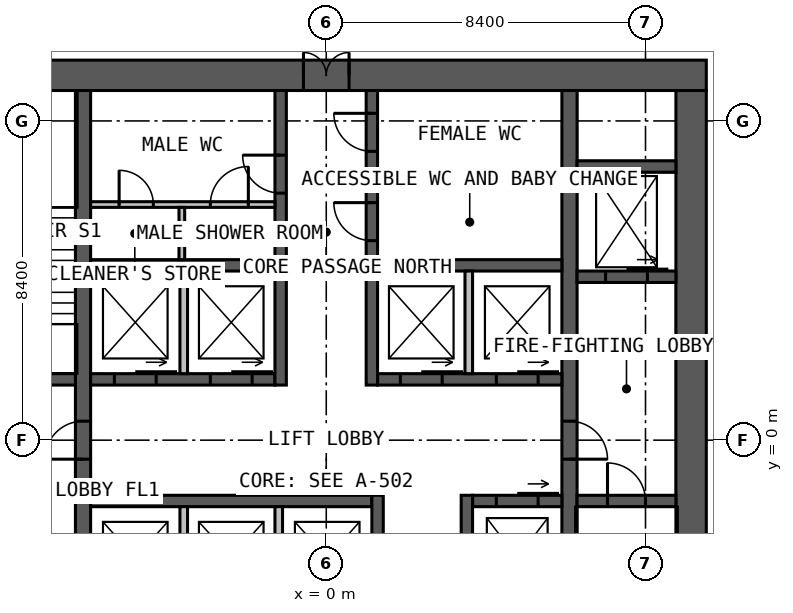
"""IFC4 building model, lengths in metres.
Left out: names, types, materials, properties, quantities, classifications, styles, units other than length and angle.
Written with IfcOpenShell. Run it as: python <this file> out.ifc"""

import sys

from ifc_helpers import new_model, si_unit, direction, frame, frame_2d, origin, place, context, subcontext, project, spatial, rectangle, extrude, element, fill, save


model = new_model("IFC4")
c1 = context("Model", 3, precision=1e-05, world=origin(), true_north=direction((0.0, 1.0)))
c2 = subcontext(c1, "Body", "Model", "MODEL_VIEW")
j1 = project(units=[si_unit("LENGTHUNIT", "METRE"), si_unit("PLANEANGLEUNIT", "RADIAN")], contexts=[c1])
p1 = place(None, origin())
s1 = spatial("IfcSite", under=j1, at=p1, CompositionType="ELEMENT")
p2 = place(p1, origin())
s2 = spatial("IfcBuilding", under=s1, at=p2, CompositionType="ELEMENT")
p3 = place(p2, frame((0.0, 0.0, 81.0)))
s3 = spatial("IfcBuildingStorey", under=s2, at=p3, CompositionType="ELEMENT", Elevation=81.0)
p4 = place(p3, frame((-10.0, 9.6, 0.0), z_axis=(0.0, 0.0, 1.0), x_axis=(1.0, 0.0, 0.0)))
e1 = element("IfcWall", 1, at=p4, inside=s3, PredefinedType="SOLIDWALL", context=c2, shape_type="SweptSolid", body=[
    extrude(rectangle(XDim=20.0, YDim=0.8, at=frame_2d((10.0, 0.0))), origin(), (0.0, 0.0, 1.0), 4.0),
])
p5 = place(p4, frame((9.4, 0.0, 0.0)))
e2 = element("IfcOpeningElement", 2, at=p5, cuts=e1, PredefinedType="OPENING", context=c2, shape_type="SweptSolid", body=[
    extrude(rectangle(XDim=1.2, YDim=2.2, at=frame_2d((0.6, 1.1))), frame((0.0, 0.41, 0.0), z_axis=(0.0, -1.0, 0.0), x_axis=(1.0, 0.0, 0.0)), (0.0, 0.0, 1.0), 0.82),
])
p6 = place(p3, frame((9.6, -9.2, 0.0), z_axis=(0.0, 0.0, 1.0), x_axis=(0.0, 1.0, 0.0)))
e3 = element("IfcWall", 3, at=p6, inside=s3, PredefinedType="SOLIDWALL", context=c2, shape_type="SweptSolid", body=[
    extrude(rectangle(XDim=18.4, YDim=0.8, at=frame_2d((9.2, 0.0))), origin(), (0.0, 0.0, 1.0), 4.0),
])
p7 = place(p3, frame((-6.4, -9.2, 0.0), z_axis=(0.0, 0.0, 1.0), x_axis=(0.0, 1.0, 0.0)))
e4 = element("IfcWall", 4, at=p7, inside=s3, PredefinedType="SOLIDWALL", context=c2, shape_type="SweptSolid", body=[
    extrude(rectangle(XDim=18.4, YDim=0.4, at=frame_2d((9.2, 0.0))), origin(), (0.0, 0.0, 1.0), 4.0),
])
p8 = place(p7, frame((8.7, 0.0, 0.0)))
e5 = element("IfcOpeningElement", 5, at=p8, cuts=e4, PredefinedType="OPENING", context=c2, shape_type="SweptSolid", body=[
    extrude(rectangle(XDim=1.0, YDim=2.2, at=frame_2d((0.5, 1.1))), frame((0.0, 0.21, 0.0), z_axis=(0.0, -1.0, 0.0), x_axis=(1.0, 0.0, 0.0)), (0.0, 0.0, 1.0), 0.42),
])
p9 = place(p3, frame((6.4, 9.2, 0.0), z_axis=(0.0, 0.0, 1.0), x_axis=(0.0, -1.0, 0.0)))
e6 = element("IfcWall", 6, at=p9, inside=s3, PredefinedType="SOLIDWALL", context=c2, shape_type="SweptSolid", body=[
    extrude(rectangle(XDim=18.4, YDim=0.4, at=frame_2d((9.2, 0.0))), origin(), (0.0, 0.0, 1.0), 4.0),
])
p10 = place(p9, frame((8.7, 0.0, 0.0)))
e7 = element("IfcOpeningElement", 7, at=p10, cuts=e6, PredefinedType="OPENING", context=c2, shape_type="SweptSolid", body=[
    extrude(rectangle(XDim=1.0, YDim=2.2, at=frame_2d((0.5, 1.1))), frame((0.0, 0.21, 0.0), z_axis=(0.0, -1.0, 0.0), x_axis=(1.0, 0.0, 0.0)), (0.0, 0.0, 1.0), 0.42),
])
p11 = place(p3, frame((-6.2, 1.6, 0.0), z_axis=(0.0, 0.0, 1.0), x_axis=(1.0, 0.0, 0.0)))
e8 = element("IfcWall", 8, at=p11, inside=s3, PredefinedType="SOLIDWALL", context=c2, shape_type="SweptSolid", body=[
    extrude(rectangle(XDim=4.85, YDim=0.3, at=frame_2d((2.425, 0.0))), origin(), (0.0, 0.0, 1.0), 4.0),
])
p12 = place(p11, frame((0.625, 0.0, 0.0)))
e9 = element("IfcOpeningElement", 9, at=p12, cuts=e8, PredefinedType="OPENING", context=c2, shape_type="SweptSolid", body=[
    extrude(rectangle(XDim=1.1, YDim=2.2, at=frame_2d((0.55, 1.1))), frame((0.0, 0.16, 0.0), z_axis=(0.0, -1.0, 0.0), x_axis=(1.0, 0.0, 0.0)), (0.0, 0.0, 1.0), 0.32),
])
p13 = place(p11, frame((3.15, 0.0, 0.0)))
e10 = element("IfcOpeningElement", 10, at=p13, cuts=e8, PredefinedType="OPENING", context=c2, shape_type="SweptSolid", body=[
    extrude(rectangle(XDim=1.1, YDim=2.2, at=frame_2d((0.55, 1.1))), frame((0.0, 0.16, 0.0), z_axis=(0.0, -1.0, 0.0), x_axis=(1.0, 0.0, 0.0)), (0.0, 0.0, 1.0), 0.32),
])
p14 = place(p3, frame((1.35, 1.6, 0.0), z_axis=(0.0, 0.0, 1.0), x_axis=(1.0, 0.0, 0.0)))
e11 = element("IfcWall", 11, at=p14, inside=s3, PredefinedType="SOLIDWALL", context=c2, shape_type="SweptSolid", body=[
    extrude(rectangle(XDim=4.85, YDim=0.3, at=frame_2d((2.425, 0.0))), origin(), (0.0, 0.0, 1.0), 4.0),
])
p15 = place(p14, frame((0.6, 0.0, 0.0)))
e12 = element("IfcOpeningElement", 12, at=p15, cuts=e11, PredefinedType="OPENING", context=c2, shape_type="SweptSolid", body=[
    extrude(rectangle(XDim=1.1, YDim=2.2, at=frame_2d((0.55, 1.1))), frame((0.0, 0.16, 0.0), z_axis=(0.0, -1.0, 0.0), x_axis=(1.0, 0.0, 0.0)), (0.0, 0.0, 1.0), 0.32),
])
p16 = place(p14, frame((3.125, 0.0, 0.0)))
e13 = element("IfcOpeningElement", 13, at=p16, cuts=e11, PredefinedType="OPENING", context=c2, shape_type="SweptSolid", body=[
    extrude(rectangle(XDim=1.1, YDim=2.2, at=frame_2d((0.55, 1.1))), frame((0.0, 0.16, 0.0), z_axis=(0.0, -1.0, 0.0), x_axis=(1.0, 0.0, 0.0)), (0.0, 0.0, 1.0), 0.32),
])
for number, where, z_axis, x_axis in (
    (14, (-6.2, 4.6, 0.0), (0.0, 0.0, 1.0), (1.0, 0.0, 0.0)),
    (15, (1.35, 4.6, 0.0), (0.0, 0.0, 1.0), (1.0, 0.0, 0.0)),
):
    element("IfcWall", number, at=place(p3, frame(where, z_axis=z_axis, x_axis=x_axis)), inside=s3, PredefinedType="SOLIDWALL", context=c2, shape_type="SweptSolid", body=[
        extrude(rectangle(XDim=4.85, YDim=0.3, at=frame_2d((2.425, 0.0))), origin(), (0.0, 0.0, 1.0), 4.0),
    ])
p17 = place(p3, frame((-1.2, 1.45, 0.0), z_axis=(0.0, 0.0, 1.0), x_axis=(0.0, 1.0, 0.0)))
e16 = element("IfcWall", 16, at=p17, inside=s3, PredefinedType="SOLIDWALL", context=c2, shape_type="SweptSolid", body=[
    extrude(rectangle(XDim=7.75, YDim=0.3, at=frame_2d((3.875, 0.0))), origin(), (0.0, 0.0, 1.0), 4.0),
])
p18 = place(p17, frame((5.05, 0.0, 0.0)))
e17 = element("IfcOpeningElement", 17, at=p18, cuts=e16, PredefinedType="OPENING", context=c2, shape_type="SweptSolid", body=[
    extrude(rectangle(XDim=1.0, YDim=2.2, at=frame_2d((0.5, 1.1))), frame((0.0, 0.16, 0.0), z_axis=(0.0, -1.0, 0.0), x_axis=(1.0, 0.0, 0.0)), (0.0, 0.0, 1.0), 0.32),
])
p19 = place(p3, frame((1.2, 1.45, 0.0), z_axis=(0.0, 0.0, 1.0), x_axis=(0.0, 1.0, 0.0)))
e18 = element("IfcWall", 18, at=p19, inside=s3, PredefinedType="SOLIDWALL", context=c2, shape_type="SweptSolid", body=[
    extrude(rectangle(XDim=7.75, YDim=0.3, at=frame_2d((3.875, 0.0))), origin(), (0.0, 0.0, 1.0), 4.0),
])
p20 = place(p19, frame((3.8, 0.0, 0.0)))
e19 = element("IfcOpeningElement", 19, at=p20, cuts=e18, PredefinedType="OPENING", context=c2, shape_type="SweptSolid", body=[
    extrude(rectangle(XDim=1.0, YDim=2.2, at=frame_2d((0.5, 1.1))), frame((0.0, 0.16, 0.0), z_axis=(0.0, -1.0, 0.0), x_axis=(1.0, 0.0, 0.0)), (0.0, 0.0, 1.0), 0.32),
])
p21 = place(p19, frame((6.15, 0.0, 0.0)))
e20 = element("IfcOpeningElement", 20, at=p21, cuts=e18, PredefinedType="OPENING", context=c2, shape_type="SweptSolid", body=[
    extrude(rectangle(XDim=1.0, YDim=2.2, at=frame_2d((0.5, 1.1))), frame((0.0, 0.16, 0.0), z_axis=(0.0, -1.0, 0.0), x_axis=(1.0, 0.0, 0.0)), (0.0, 0.0, 1.0), 0.32),
])
p22 = place(p3, frame((-6.2, -1.6, 0.0), z_axis=(0.0, 0.0, 1.0), x_axis=(1.0, 0.0, 0.0)))
e21 = element("IfcWall", 21, at=p22, inside=s3, PredefinedType="SOLIDWALL", context=c2, shape_type="SweptSolid", body=[
    extrude(rectangle(XDim=7.4, YDim=0.3, at=frame_2d((3.7, 0.0))), origin(), (0.0, 0.0, 1.0), 4.0),
])
p23 = place(p3, frame((3.85, -1.6, 0.0), z_axis=(0.0, 0.0, 1.0), x_axis=(1.0, 0.0, 0.0)))
e22 = element("IfcWall", 22, at=p23, inside=s3, PredefinedType="SOLIDWALL", context=c2, shape_type="SweptSolid", body=[
    extrude(rectangle(XDim=2.35, YDim=0.3, at=frame_2d((1.175, 0.0))), origin(), (0.0, 0.0, 1.0), 4.0),
])
p24 = place(p23, frame((0.625, 0.0, 0.0)))
e23 = element("IfcOpeningElement", 23, at=p24, cuts=e22, PredefinedType="OPENING", context=c2, shape_type="SweptSolid", body=[
    extrude(rectangle(XDim=1.1, YDim=2.2, at=frame_2d((0.55, 1.1))), frame((0.0, 0.16, 0.0), z_axis=(0.0, -1.0, 0.0), x_axis=(1.0, 0.0, 0.0)), (0.0, 0.0, 1.0), 0.32),
])
p25 = place(p3, frame((1.35, -1.45, 0.0), z_axis=(0.0, 0.0, 1.0), x_axis=(0.0, -1.0, 0.0)))
e24 = element("IfcWall", 24, at=p25, inside=s3, PredefinedType="SOLIDWALL", context=c2, shape_type="SweptSolid", body=[
    extrude(rectangle(XDim=7.75, YDim=0.3, at=frame_2d((3.875, 0.0))), origin(), (0.0, 0.0, 1.0), 4.0),
])
p26 = place(p25, frame((5.8, 0.0, 0.0)))
e25 = element("IfcOpeningElement", 25, at=p26, cuts=e24, PredefinedType="OPENING", context=c2, shape_type="SweptSolid", body=[
    extrude(rectangle(XDim=1.0, YDim=2.2, at=frame_2d((0.5, 1.1))), frame((0.0, 0.16, 0.0), z_axis=(0.0, -1.0, 0.0), x_axis=(1.0, 0.0, 0.0)), (0.0, 0.0, 1.0), 0.32),
])
p27 = place(p25, frame((3.525, 0.0, 0.0)))
e26 = element("IfcOpeningElement", 26, at=p27, cuts=e24, PredefinedType="OPENING", context=c2, shape_type="SweptSolid", body=[
    extrude(rectangle(XDim=0.9, YDim=2.2, at=frame_2d((0.45, 1.1))), frame((0.0, 0.16, 0.0), z_axis=(0.0, -1.0, 0.0), x_axis=(1.0, 0.0, 0.0)), (0.0, 0.0, 1.0), 0.32),
])
p28 = place(p3, frame((3.7, -1.45, 0.0), z_axis=(0.0, 0.0, 1.0), x_axis=(0.0, -1.0, 0.0)))
e27 = element("IfcWall", 27, at=p28, inside=s3, PredefinedType="SOLIDWALL", context=c2, shape_type="SweptSolid", body=[
    extrude(rectangle(XDim=7.75, YDim=0.3, at=frame_2d((3.875, 0.0))), origin(), (0.0, 0.0, 1.0), 4.0),
])
p29 = place(p28, frame((5.1, 0.0, 0.0)))
e28 = element("IfcOpeningElement", 28, at=p29, cuts=e27, PredefinedType="OPENING", context=c2, shape_type="SweptSolid", body=[
    extrude(rectangle(XDim=0.9, YDim=2.2, at=frame_2d((0.45, 1.1))), frame((0.0, 0.16, 0.0), z_axis=(0.0, -1.0, 0.0), x_axis=(1.0, 0.0, 0.0)), (0.0, 0.0, 1.0), 0.32),
])
p30 = place(p3, frame((-9.2, 1.6, 0.0), z_axis=(0.0, 0.0, 1.0), x_axis=(1.0, 0.0, 0.0)))
e29 = element("IfcWall", 29, at=p30, inside=s3, PredefinedType="SOLIDWALL", context=c2, shape_type="SweptSolid", body=[
    extrude(rectangle(XDim=2.6, YDim=0.3, at=frame_2d((1.3, 0.0))), origin(), (0.0, 0.0, 1.0), 4.0),
])
p31 = place(p30, frame((0.8, 0.0, 0.0)))
e30 = element("IfcOpeningElement", 30, at=p31, cuts=e29, PredefinedType="OPENING", context=c2, shape_type="SweptSolid", body=[
    extrude(rectangle(XDim=1.0, YDim=2.2, at=frame_2d((0.5, 1.1))), frame((0.0, 0.16, 0.0), z_axis=(0.0, -1.0, 0.0), x_axis=(1.0, 0.0, 0.0)), (0.0, 0.0, 1.0), 0.32),
])
p32 = place(p3, frame((6.6, -1.6, 0.0), z_axis=(0.0, 0.0, 1.0), x_axis=(1.0, 0.0, 0.0)))
e31 = element("IfcWall", 31, at=p32, inside=s3, PredefinedType="SOLIDWALL", context=c2, shape_type="SweptSolid", body=[
    extrude(rectangle(XDim=2.6, YDim=0.3, at=frame_2d((1.3, 0.0))), origin(), (0.0, 0.0, 1.0), 4.0),
])
p33 = place(p32, frame((0.8, 0.0, 0.0)))
e32 = element("IfcOpeningElement", 32, at=p33, cuts=e31, PredefinedType="OPENING", context=c2, shape_type="SweptSolid", body=[
    extrude(rectangle(XDim=1.0, YDim=2.2, at=frame_2d((0.5, 1.1))), frame((0.0, 0.16, 0.0), z_axis=(0.0, -1.0, 0.0), x_axis=(1.0, 0.0, 0.0)), (0.0, 0.0, 1.0), 0.32),
])
p34 = place(p3, frame((6.6, 4.3, 0.0), z_axis=(0.0, 0.0, 1.0), x_axis=(1.0, 0.0, 0.0)))
e33 = element("IfcWall", 33, at=p34, inside=s3, PredefinedType="SOLIDWALL", context=c2, shape_type="SweptSolid", body=[
    extrude(rectangle(XDim=2.6, YDim=0.3, at=frame_2d((1.3, 0.0))), origin(), (0.0, 0.0, 1.0), 4.0),
])
p35 = place(p34, frame((0.75, 0.0, 0.0)))
e34 = element("IfcOpeningElement", 34, at=p35, cuts=e33, PredefinedType="OPENING", context=c2, shape_type="SweptSolid", body=[
    extrude(rectangle(XDim=1.1, YDim=2.2, at=frame_2d((0.55, 1.1))), frame((0.0, 0.16, 0.0), z_axis=(0.0, -1.0, 0.0), x_axis=(1.0, 0.0, 0.0)), (0.0, 0.0, 1.0), 0.32),
])
p36 = place(p3, frame((6.6, 7.2, 0.0), z_axis=(0.0, 0.0, 1.0), x_axis=(1.0, 0.0, 0.0)))
e35 = element("IfcWall", 35, at=p36, inside=s3, PredefinedType="SOLIDWALL", context=c2, shape_type="SweptSolid", body=[
    extrude(rectangle(XDim=2.6, YDim=0.3, at=frame_2d((1.3, 0.0))), origin(), (0.0, 0.0, 1.0), 4.0),
])
for number, where, z_axis, x_axis in (
    (36, (-3.75, 1.75, 0.0), (0.0, 0.0, 1.0), (0.0, 1.0, 0.0)),
    (37, (3.75, 1.75, 0.0), (0.0, 0.0, 1.0), (0.0, 1.0, 0.0)),
    (38, (-3.75, -1.75, 0.0), (0.0, 0.0, 1.0), (0.0, -1.0, 0.0)),
    (39, (-1.25, -1.75, 0.0), (0.0, 0.0, 1.0), (0.0, -1.0, 0.0)),
):
    element("IfcWall", number, at=place(p3, frame(where, z_axis=z_axis, x_axis=x_axis)), inside=s3, PredefinedType="SOLIDWALL", context=c2, shape_type="SweptSolid", body=[
        extrude(rectangle(XDim=2.7, YDim=0.2, at=frame_2d((1.35, 0.0))), origin(), (0.0, 0.0, 1.0), 3.75),
    ])
p37 = place(p3, frame((1.35, 6.8, 0.0), z_axis=(0.0, 0.0, 1.0), x_axis=(1.0, 0.0, 0.0)))
e40 = element("IfcWall", 40, at=p37, inside=s3, PredefinedType="PARTITIONING", context=c2, shape_type="SweptSolid", body=[
    extrude(rectangle(XDim=4.85, YDim=0.15, at=frame_2d((2.425, 0.0))), origin(), (0.0, 0.0, 1.0), 3.75),
])
p38 = place(p3, frame((-6.2, 6.2, 0.0), z_axis=(0.0, 0.0, 1.0), x_axis=(1.0, 0.0, 0.0)))
e41 = element("IfcWall", 41, at=p38, inside=s3, PredefinedType="PARTITIONING", context=c2, shape_type="SweptSolid", body=[
    extrude(rectangle(XDim=4.85, YDim=0.15, at=frame_2d((2.425, 0.0))), origin(), (0.0, 0.0, 1.0), 3.75),
])
p39 = place(p38, frame((3.15, 0.0, 0.0)))
e42 = element("IfcOpeningElement", 42, at=p39, cuts=e41, PredefinedType="OPENING", context=c2, shape_type="SweptSolid", body=[
    extrude(rectangle(XDim=1.0, YDim=2.2, at=frame_2d((0.5, 1.1))), frame((0.0, 0.085, 0.0), z_axis=(0.0, -1.0, 0.0), x_axis=(1.0, 0.0, 0.0)), (0.0, 0.0, 1.0), 0.17),
])
p40 = place(p38, frame((0.75, 0.0, 0.0)))
e43 = element("IfcOpeningElement", 43, at=p40, cuts=e41, PredefinedType="OPENING", context=c2, shape_type="SweptSolid", body=[
    extrude(rectangle(XDim=0.9, YDim=2.2, at=frame_2d((0.45, 1.1))), frame((0.0, 0.085, 0.0), z_axis=(0.0, -1.0, 0.0), x_axis=(1.0, 0.0, 0.0)), (0.0, 0.0, 1.0), 0.17),
])
p41 = place(p3, frame((-3.8, 4.75, 0.0), z_axis=(0.0, 0.0, 1.0), x_axis=(0.0, 1.0, 0.0)))
e44 = element("IfcWall", 44, at=p41, inside=s3, PredefinedType="PARTITIONING", context=c2, shape_type="SweptSolid", body=[
    extrude(rectangle(XDim=1.375, YDim=0.15, at=frame_2d((0.688, 0.0))), origin(), (0.0, 0.0, 1.0), 3.75),
])
p42 = place(p5, origin())
e45 = element("IfcDoor", 45, at=p42, inside=s3, OperationType="DOUBLE_DOOR_SINGLE_SWING", PredefinedType="DOOR", context=c2, shape_type="SweptSolid", body=[
    extrude(rectangle(XDim=1.2, YDim=2.2, at=frame_2d((0.6, 1.1))), frame((0.0, 0.025, 0.0), z_axis=(0.0, -1.0, 0.0), x_axis=(1.0, 0.0, 0.0)), (0.0, 0.0, 1.0), 0.05),
])
fill(e2, e45)
p43 = place(p8, origin())
e46 = element("IfcDoor", 46, at=p43, inside=s3, OperationType="SINGLE_SWING_LEFT", PredefinedType="DOOR", context=c2, shape_type="SweptSolid", body=[
    extrude(rectangle(XDim=1.0, YDim=2.2, at=frame_2d((0.5, 1.1))), frame((0.0, 0.025, 0.0), z_axis=(0.0, -1.0, 0.0), x_axis=(1.0, 0.0, 0.0)), (0.0, 0.0, 1.0), 0.05),
])
fill(e5, e46)
p44 = place(p10, origin())
e47 = element("IfcDoor", 47, at=p44, inside=s3, OperationType="SINGLE_SWING_RIGHT", PredefinedType="DOOR", context=c2, shape_type="SweptSolid", body=[
    extrude(rectangle(XDim=1.0, YDim=2.2, at=frame_2d((0.5, 1.1))), frame((0.0, 0.025, 0.0), z_axis=(0.0, -1.0, 0.0), x_axis=(1.0, 0.0, 0.0)), (0.0, 0.0, 1.0), 0.05),
])
fill(e7, e47)
p45 = place(p33, origin())
e48 = element("IfcDoor", 48, at=p45, inside=s3, OperationType="SINGLE_SWING_LEFT", PredefinedType="DOOR", context=c2, shape_type="SweptSolid", body=[
    extrude(rectangle(XDim=1.0, YDim=2.2, at=frame_2d((0.5, 1.1))), frame((0.0, 0.025, 0.0), z_axis=(0.0, -1.0, 0.0), x_axis=(1.0, 0.0, 0.0)), (0.0, 0.0, 1.0), 0.05),
])
fill(e32, e48)
p46 = place(p18, origin())
e49 = element("IfcDoor", 49, at=p46, inside=s3, OperationType="SINGLE_SWING_RIGHT", PredefinedType="DOOR", context=c2, shape_type="SweptSolid", body=[
    extrude(rectangle(XDim=1.0, YDim=2.2, at=frame_2d((0.5, 1.1))), frame((0.0, 0.025, 0.0), z_axis=(0.0, -1.0, 0.0), x_axis=(1.0, 0.0, 0.0)), (0.0, 0.0, 1.0), 0.05),
])
fill(e17, e49)
p47 = place(p20, origin())
e50 = element("IfcDoor", 50, at=p47, inside=s3, OperationType="SINGLE_SWING_RIGHT", PredefinedType="DOOR", context=c2, shape_type="SweptSolid", body=[
    extrude(rectangle(XDim=1.0, YDim=2.2, at=frame_2d((0.5, 1.1))), frame((0.0, 0.025, 0.0), z_axis=(0.0, -1.0, 0.0), x_axis=(1.0, 0.0, 0.0)), (0.0, 0.0, 1.0), 0.05),
])
fill(e19, e50)
p48 = place(p21, origin())
e51 = element("IfcDoor", 51, at=p48, inside=s3, OperationType="SINGLE_SWING_RIGHT", PredefinedType="DOOR", context=c2, shape_type="SweptSolid", body=[
    extrude(rectangle(XDim=1.0, YDim=2.2, at=frame_2d((0.5, 1.1))), frame((0.0, 0.025, 0.0), z_axis=(0.0, -1.0, 0.0), x_axis=(1.0, 0.0, 0.0)), (0.0, 0.0, 1.0), 0.05),
])
fill(e20, e51)
p49 = place(p39, origin())
e52 = element("IfcDoor", 52, at=p49, inside=s3, OperationType="SINGLE_SWING_RIGHT", PredefinedType="DOOR", context=c2, shape_type="SweptSolid", body=[
    extrude(rectangle(XDim=1.0, YDim=2.2, at=frame_2d((0.5, 1.1))), frame((0.0, 0.025, 0.0), z_axis=(0.0, -1.0, 0.0), x_axis=(1.0, 0.0, 0.0)), (0.0, 0.0, 1.0), 0.05),
])
fill(e42, e52)
p50 = place(p40, origin())
e53 = element("IfcDoor", 53, at=p50, inside=s3, OperationType="SINGLE_SWING_LEFT", PredefinedType="DOOR", context=c2, shape_type="SweptSolid", body=[
    extrude(rectangle(XDim=0.9, YDim=2.2, at=frame_2d((0.45, 1.1))), frame((0.0, 0.025, 0.0), z_axis=(0.0, -1.0, 0.0), x_axis=(1.0, 0.0, 0.0)), (0.0, 0.0, 1.0), 0.05),
])
fill(e43, e53)
p51 = place(p12, origin())
e54 = element("IfcDoor", 54, at=p51, inside=s3, OperationType="SLIDING_TO_LEFT", PredefinedType="DOOR", context=c2, shape_type="SweptSolid", body=[
    extrude(rectangle(XDim=1.1, YDim=2.2, at=frame_2d((0.55, 1.1))), frame((0.0, 0.025, 0.0), z_axis=(0.0, -1.0, 0.0), x_axis=(1.0, 0.0, 0.0)), (0.0, 0.0, 1.0), 0.05),
])
fill(e9, e54)
p52 = place(p13, origin())
e55 = element("IfcDoor", 55, at=p52, inside=s3, OperationType="SLIDING_TO_LEFT", PredefinedType="DOOR", context=c2, shape_type="SweptSolid", body=[
    extrude(rectangle(XDim=1.1, YDim=2.2, at=frame_2d((0.55, 1.1))), frame((0.0, 0.025, 0.0), z_axis=(0.0, -1.0, 0.0), x_axis=(1.0, 0.0, 0.0)), (0.0, 0.0, 1.0), 0.05),
])
fill(e10, e55)
p53 = place(p15, origin())
e56 = element("IfcDoor", 56, at=p53, inside=s3, OperationType="SLIDING_TO_LEFT", PredefinedType="DOOR", context=c2, shape_type="SweptSolid", body=[
    extrude(rectangle(XDim=1.1, YDim=2.2, at=frame_2d((0.55, 1.1))), frame((0.0, 0.025, 0.0), z_axis=(0.0, -1.0, 0.0), x_axis=(1.0, 0.0, 0.0)), (0.0, 0.0, 1.0), 0.05),
])
fill(e12, e56)
p54 = place(p16, origin())
e57 = element("IfcDoor", 57, at=p54, inside=s3, OperationType="SLIDING_TO_LEFT", PredefinedType="DOOR", context=c2, shape_type="SweptSolid", body=[
    extrude(rectangle(XDim=1.1, YDim=2.2, at=frame_2d((0.55, 1.1))), frame((0.0, 0.025, 0.0), z_axis=(0.0, -1.0, 0.0), x_axis=(1.0, 0.0, 0.0)), (0.0, 0.0, 1.0), 0.05),
])
fill(e13, e57)
p55 = place(p24, origin())
e58 = element("IfcDoor", 58, at=p55, inside=s3, OperationType="SLIDING_TO_LEFT", PredefinedType="DOOR", context=c2, shape_type="SweptSolid", body=[
    extrude(rectangle(XDim=1.1, YDim=2.2, at=frame_2d((0.55, 1.1))), frame((0.0, 0.025, 0.0), z_axis=(0.0, -1.0, 0.0), x_axis=(1.0, 0.0, 0.0)), (0.0, 0.0, 1.0), 0.05),
])
fill(e23, e58)
p56 = place(p35, origin())
e59 = element("IfcDoor", 59, at=p56, inside=s3, OperationType="SLIDING_TO_LEFT", PredefinedType="DOOR", context=c2, shape_type="SweptSolid", body=[
    extrude(rectangle(XDim=1.1, YDim=2.2, at=frame_2d((0.55, 1.1))), frame((0.0, 0.025, 0.0), z_axis=(0.0, -1.0, 0.0), x_axis=(1.0, 0.0, 0.0)), (0.0, 0.0, 1.0), 0.05),
])
fill(e34, e59)
save(model, sys.argv[1])
